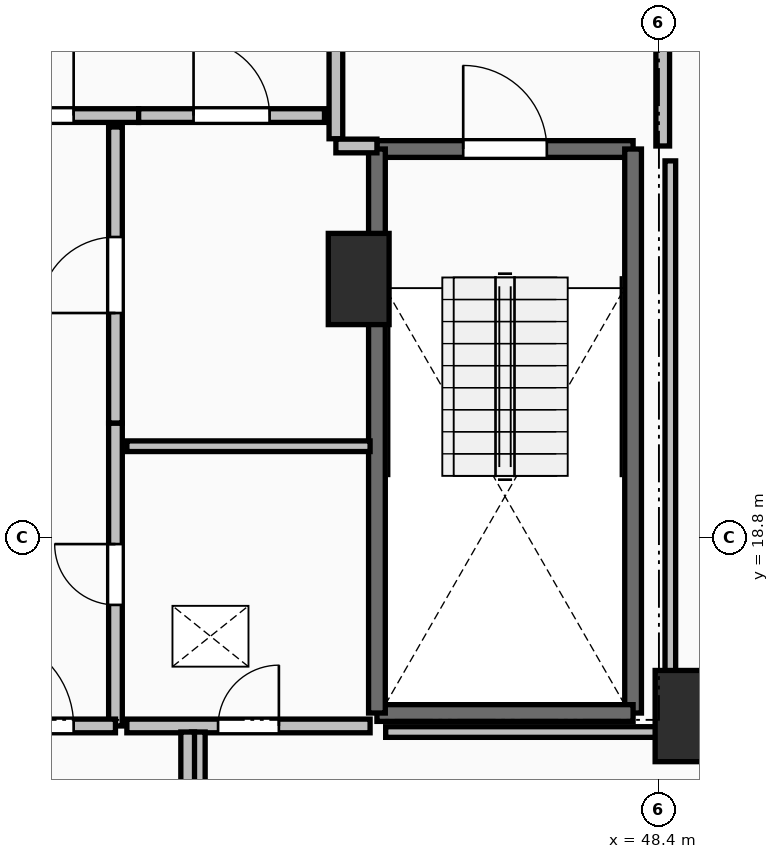
"""IFC4 building model, lengths in metres.
Left out: names, types, materials, properties, quantities, classifications, styles, units other than length and angle.
Written with IfcOpenShell. Run it as: python <this file> out.ifc"""

import sys

from ifc_helpers import new_model, si_unit, direction, frame, frame_2d, origin, origin_2d, place, context, subcontext, project, spatial, rectangle, extrude, element, fill, save


model = new_model("IFC4")
c1 = context("Model", 3, precision=1e-05, world=origin(), true_north=direction((0.0, 1.0)))
c2 = subcontext(c1, "Body", "Model", "MODEL_VIEW")
j1 = project(units=[si_unit("LENGTHUNIT", "METRE"), si_unit("PLANEANGLEUNIT", "RADIAN")], contexts=[c1])
p1 = place(None, origin())
s1 = spatial("IfcSite", under=j1, at=p1, CompositionType="ELEMENT")
p2 = place(p1, origin())
s2 = spatial("IfcBuilding", under=s1, at=p2, CompositionType="ELEMENT")
p3 = place(p2, frame((0.0, 0.0, 99.8)))
s3 = spatial("IfcBuildingStorey", under=s2, at=p3, CompositionType="ELEMENT", Elevation=99.8)
for number, where, z_axis, x_axis in (
    (1, (48.75, 16.45, 0.0), (0.0, 0.0, 1.0), (1.0, 0.0, 0.0)),
    (2, (44.45, 22.2, 0.0), (0.0, 0.0, 1.0), (1.0, 0.0, 0.0)),
):
    element("IfcColumn", number, at=place(p3, frame(where, z_axis=z_axis, x_axis=x_axis)), inside=s3, PredefinedType="PILASTER", context=c2, shape_type="SweptSolid", body=[
        extrude(rectangle(XDim=0.8, YDim=1.2, at=origin_2d()), origin(), (0.0, 0.0, 1.0), 3.5),
    ])
p4 = place(p3, frame((44.69, 23.91, 0.0), z_axis=(0.0, 0.0, 1.0), x_axis=(1.0, 0.0, 0.0)))
e3 = element("IfcWall", 3, at=p4, inside=s3, PredefinedType="SOLIDWALL", context=c2, shape_type="SweptSolid", body=[
    extrude(rectangle(XDim=3.37, YDim=0.22, at=frame_2d((1.685, 0.0))), origin(), (0.0, 0.0, 1.0), 3.24),
])
p5 = place(p4, frame((1.135, 0.0, 0.0)))
e4 = element("IfcOpeningElement", 4, at=p5, cuts=e3, PredefinedType="OPENING", context=c2, shape_type="SweptSolid", body=[
    extrude(rectangle(XDim=1.1, YDim=2.15, at=frame_2d((0.55, 1.075))), frame((0.0, 0.125, 0.0), z_axis=(0.0, -1.0, 0.0), x_axis=(1.0, 0.0, 0.0)), (0.0, 0.0, 1.0), 0.25),
])
p6 = place(p3, frame((48.06, 23.91, 0.0), z_axis=(0.0, 0.0, 1.0), x_axis=(0.0, -1.0, 0.0)))
e5 = element("IfcWall", 5, at=p6, inside=s3, PredefinedType="SOLIDWALL", context=c2, shape_type="SweptSolid", body=[
    extrude(rectangle(XDim=7.42, YDim=0.22, at=frame_2d((3.71, 0.0))), origin(), (0.0, 0.0, 1.0), 3.24),
])
p7 = place(p3, frame((48.06, 16.49, 0.0), z_axis=(0.0, 0.0, 1.0), x_axis=(-1.0, 0.0, 0.0)))
e6 = element("IfcWall", 6, at=p7, inside=s3, PredefinedType="SOLIDWALL", context=c2, shape_type="SweptSolid", body=[
    extrude(rectangle(XDim=3.37, YDim=0.22, at=frame_2d((1.685, 0.0))), origin(), (0.0, 0.0, 1.0), 3.24),
])
p8 = place(p3, frame((44.69, 16.49, 0.0), z_axis=(0.0, 0.0, 1.0), x_axis=(0.0, 1.0, 0.0)))
e7 = element("IfcWall", 7, at=p8, inside=s3, PredefinedType="SOLIDWALL", context=c2, shape_type="SweptSolid", body=[
    extrude(rectangle(XDim=7.42, YDim=0.22, at=frame_2d((3.71, 0.0))), origin(), (0.0, 0.0, 1.0), 3.24),
])
p9 = place(p3, frame((44.15, 27.955, 0.0), z_axis=(0.0, 0.0, 1.0), x_axis=(0.0, -1.0, 0.0)))
e8 = element("IfcWall", 8, at=p9, inside=s3, PredefinedType="PARTITIONING", context=c2, shape_type="SweptSolid", body=[
    extrude(rectangle(XDim=3.91, YDim=0.18, at=frame_2d((1.955, 0.0))), origin(), (0.0, 0.0, 1.0), 3.24),
])
p10 = place(p9, frame((1.355, 0.0, 0.0)))
e9 = element("IfcOpeningElement", 9, at=p10, cuts=e8, PredefinedType="OPENING", context=c2, shape_type="SweptSolid", body=[
    extrude(rectangle(XDim=1.2, YDim=2.15, at=frame_2d((0.6, 1.075))), frame((0.0, 0.105, 0.0), z_axis=(0.0, -1.0, 0.0), x_axis=(1.0, 0.0, 0.0)), (0.0, 0.0, 1.0), 0.21),
])
p11 = place(p3, frame((44.15, 23.95, 0.0), z_axis=(0.0, 0.0, 1.0), x_axis=(1.0, 0.0, 0.0)))
e10 = element("IfcWall", 10, at=p11, inside=s3, PredefinedType="PARTITIONING", context=c2, shape_type="SweptSolid", body=[
    extrude(rectangle(XDim=0.54, YDim=0.18, at=frame_2d((0.27, 0.0))), origin(), (0.0, 0.0, 1.0), 3.24),
])
p12 = place(p3, frame((48.45, 23.95, 0.0), z_axis=(0.0, 0.0, 1.0), x_axis=(0.0, 1.0, 0.0)))
e11 = element("IfcWall", 11, at=p12, inside=s3, PredefinedType="PARTITIONING", context=c2, shape_type="SweptSolid", body=[
    extrude(rectangle(XDim=4.05, YDim=0.18, at=frame_2d((2.025, 0.0))), origin(), (0.0, 0.0, 1.0), 3.24),
])
p13 = place(p12, frame((1.425, 0.0, 0.0)))
e12 = element("IfcOpeningElement", 12, at=p13, cuts=e11, PredefinedType="OPENING", context=c2, shape_type="SweptSolid", body=[
    extrude(rectangle(XDim=1.2, YDim=2.15, at=frame_2d((0.6, 1.075))), frame((0.0, 0.105, 0.0), z_axis=(0.0, -1.0, 0.0), x_axis=(1.0, 0.0, 0.0)), (0.0, 0.0, 1.0), 0.21),
])
p14 = place(p3, frame((38.645, 24.35, 0.0), z_axis=(0.0, 0.0, 1.0), x_axis=(1.0, 0.0, 0.0)))
e13 = element("IfcWall", 13, at=p14, inside=s3, PredefinedType="PARTITIONING", context=c2, shape_type="SweptSolid", body=[
    extrude(rectangle(XDim=2.91, YDim=0.18, at=frame_2d((1.455, 0.0))), origin(), (0.0, 0.0, 1.0), 3.24),
])
p15 = place(p14, frame((0.855, 0.0, 0.0)))
e14 = element("IfcOpeningElement", 14, at=p15, cuts=e13, PredefinedType="OPENING", context=c2, shape_type="SweptSolid", body=[
    extrude(rectangle(XDim=1.2, YDim=2.15, at=frame_2d((0.6, 1.075))), frame((0.0, 0.105, 0.0), z_axis=(0.0, -1.0, 0.0), x_axis=(1.0, 0.0, 0.0)), (0.0, 0.0, 1.0), 0.21),
])
p16 = place(p3, frame((41.555, 24.35, 0.0), z_axis=(0.0, 0.0, 1.0), x_axis=(1.0, 0.0, 0.0)))
e15 = element("IfcWall", 15, at=p16, inside=s3, PredefinedType="PARTITIONING", context=c2, shape_type="SweptSolid", body=[
    extrude(rectangle(XDim=2.445, YDim=0.18, at=frame_2d((1.223, 0.0))), origin(), (0.0, 0.0, 1.0), 3.24),
])
p17 = place(p16, frame((0.722, 0.0, 0.0)))
e16 = element("IfcOpeningElement", 16, at=p17, cuts=e15, PredefinedType="OPENING", context=c2, shape_type="SweptSolid", body=[
    extrude(rectangle(XDim=1.0, YDim=2.15, at=frame_2d((0.5, 1.075))), frame((0.0, 0.105, 0.0), z_axis=(0.0, -1.0, 0.0), x_axis=(1.0, 0.0, 0.0)), (0.0, 0.0, 1.0), 0.21),
])
p18 = place(p3, frame((41.25, 16.32, 0.0), z_axis=(0.0, 0.0, 1.0), x_axis=(0.0, 1.0, 0.0)))
e17 = element("IfcWall", 17, at=p18, inside=s3, PredefinedType="PARTITIONING", context=c2, shape_type="SweptSolid", body=[
    extrude(rectangle(XDim=3.985, YDim=0.18, at=frame_2d((1.992, 0.0))), origin(), (0.0, 0.0, 1.0), 3.24),
])
p19 = place(p18, frame((1.593, 0.0, 0.0)))
e18 = element("IfcOpeningElement", 18, at=p19, cuts=e17, PredefinedType="OPENING", context=c2, shape_type="SweptSolid", body=[
    extrude(rectangle(XDim=0.8, YDim=2.05, at=frame_2d((0.4, 1.025))), frame((0.0, 0.105, 0.0), z_axis=(0.0, -1.0, 0.0), x_axis=(1.0, 0.0, 0.0)), (0.0, 0.0, 1.0), 0.21),
])
p20 = place(p3, frame((41.25, 20.305, 0.0), z_axis=(0.0, 0.0, 1.0), x_axis=(0.0, 1.0, 0.0)))
e19 = element("IfcWall", 19, at=p20, inside=s3, PredefinedType="PARTITIONING", context=c2, shape_type="SweptSolid", body=[
    extrude(rectangle(XDim=3.895, YDim=0.18, at=frame_2d((1.948, 0.0))), origin(), (0.0, 0.0, 1.0), 3.24),
])
p21 = place(p20, frame((1.448, 0.0, 0.0)))
e20 = element("IfcOpeningElement", 20, at=p21, cuts=e19, PredefinedType="OPENING", context=c2, shape_type="SweptSolid", body=[
    extrude(rectangle(XDim=1.0, YDim=2.15, at=frame_2d((0.5, 1.075))), frame((0.0, 0.105, 0.0), z_axis=(0.0, -1.0, 0.0), x_axis=(1.0, 0.0, 0.0)), (0.0, 0.0, 1.0), 0.21),
])
p22 = place(p3, frame((38.95, 16.32, 0.0), z_axis=(0.0, 0.0, 1.0), x_axis=(1.0, 0.0, 0.0)))
e21 = element("IfcWall", 21, at=p22, inside=s3, PredefinedType="PARTITIONING", context=c2, shape_type="SweptSolid", body=[
    extrude(rectangle(XDim=2.3, YDim=0.18, at=frame_2d((1.15, 0.0))), origin(), (0.0, 0.0, 1.0), 3.24),
])
p23 = place(p22, frame((0.55, 0.0, 0.0)))
e22 = element("IfcOpeningElement", 22, at=p23, cuts=e21, PredefinedType="OPENING", context=c2, shape_type="SweptSolid", body=[
    extrude(rectangle(XDim=1.2, YDim=2.15, at=frame_2d((0.6, 1.075))), frame((0.0, 0.105, 0.0), z_axis=(0.0, -1.0, 0.0), x_axis=(1.0, 0.0, 0.0)), (0.0, 0.0, 1.0), 0.21),
])
p24 = place(p3, frame((44.6, 20.0, 0.0), z_axis=(0.0, 0.0, 1.0), x_axis=(-1.0, 0.0, 0.0)))
e23 = element("IfcWall", 23, at=p24, inside=s3, PredefinedType="PARTITIONING", context=c2, shape_type="SweptSolid", body=[
    extrude(rectangle(XDim=3.2, YDim=0.14, at=frame_2d((1.6, 0.0))), origin(), (0.0, 0.0, 1.0), 3.24),
])
p25 = place(p3, frame((41.4, 16.32, 0.0), z_axis=(0.0, 0.0, 1.0), x_axis=(1.0, 0.0, 0.0)))
e24 = element("IfcWall", 24, at=p25, inside=s3, PredefinedType="PARTITIONING", context=c2, shape_type="SweptSolid", body=[
    extrude(rectangle(XDim=3.2, YDim=0.18, at=frame_2d((1.6, 0.0))), origin(), (0.0, 0.0, 1.0), 3.24),
])
p26 = place(p25, frame((1.2, 0.0, 0.0)))
e25 = element("IfcOpeningElement", 25, at=p26, cuts=e24, PredefinedType="OPENING", context=c2, shape_type="SweptSolid", body=[
    extrude(rectangle(XDim=0.8, YDim=2.05, at=frame_2d((0.4, 1.025))), frame((0.0, 0.105, 0.0), z_axis=(0.0, -1.0, 0.0), x_axis=(1.0, 0.0, 0.0)), (0.0, 0.0, 1.0), 0.21),
])
for number, where, z_axis, x_axis in (
    (26, (42.34, 16.24, 0.0), (0.0, 0.0, 1.0), (0.0, -1.0, 0.0)),
    (27, (42.2, 14.1, 0.0), (0.0, 0.0, 1.0), (0.0, 1.0, 0.0)),
):
    element("IfcWall", number, at=place(p3, frame(where, z_axis=z_axis, x_axis=x_axis)), inside=s3, PredefinedType="PARTITIONING", context=c2, shape_type="SweptSolid", body=[
        extrude(rectangle(XDim=2.14, YDim=0.18, at=frame_2d((1.07, 0.0))), origin(), (0.0, 0.0, 1.0), 3.24),
    ])
p27 = place(p3, frame((48.55, 23.754, 0.0), z_axis=(0.0, 0.0, 1.0), x_axis=(0.0, -1.0, 0.0)))
e28 = element("IfcWall", 28, at=p27, inside=s3, PredefinedType="PARTITIONING", context=c2, shape_type="SweptSolid", body=[
    extrude(rectangle(XDim=7.514, YDim=0.14, at=frame_2d((3.757, 0.0))), origin(), (0.0, 0.0, 1.0), 2.432),
])
p28 = place(p3, frame((48.55, 16.24, 0.0), z_axis=(0.0, 0.0, 1.0), x_axis=(-1.0, 0.0, 0.0)))
e29 = element("IfcWall", 29, at=p28, inside=s3, PredefinedType="PARTITIONING", context=c2, shape_type="SweptSolid", body=[
    extrude(rectangle(XDim=3.745, YDim=0.14, at=frame_2d((1.873, 0.0))), origin(), (0.0, 0.0, 1.0), 2.432),
])
p29 = place(p5, origin())
e30 = element("IfcDoor", 30, at=p29, inside=s3, OperationType="SINGLE_SWING_LEFT", PredefinedType="DOOR", context=c2, shape_type="SweptSolid", body=[
    extrude(rectangle(XDim=1.1, YDim=2.15, at=frame_2d((0.55, 1.075))), frame((0.0, 0.025, 0.0), z_axis=(0.0, -1.0, 0.0), x_axis=(1.0, 0.0, 0.0)), (0.0, 0.0, 1.0), 0.05),
])
fill(e4, e30)
p30 = place(p15, origin())
e31 = element("IfcDoor", 31, at=p30, inside=s3, OperationType="SINGLE_SWING_RIGHT", PredefinedType="DOOR", context=c2, shape_type="SweptSolid", body=[
    extrude(rectangle(XDim=1.2, YDim=2.15, at=frame_2d((0.6, 1.075))), frame((0.0, 0.025, 0.0), z_axis=(0.0, -1.0, 0.0), x_axis=(1.0, 0.0, 0.0)), (0.0, 0.0, 1.0), 0.05),
])
fill(e14, e31)
p31 = place(p17, origin())
e32 = element("IfcDoor", 32, at=p31, inside=s3, OperationType="SINGLE_SWING_LEFT", PredefinedType="DOOR", context=c2, shape_type="SweptSolid", body=[
    extrude(rectangle(XDim=1.0, YDim=2.15, at=frame_2d((0.5, 1.075))), frame((0.0, 0.025, 0.0), z_axis=(0.0, -1.0, 0.0), x_axis=(1.0, 0.0, 0.0)), (0.0, 0.0, 1.0), 0.05),
])
fill(e16, e32)
p32 = place(p19, origin())
e33 = element("IfcDoor", 33, at=p32, inside=s3, OperationType="SINGLE_SWING_RIGHT", PredefinedType="DOOR", context=c2, shape_type="SweptSolid", body=[
    extrude(rectangle(XDim=0.8, YDim=2.05, at=frame_2d((0.4, 1.025))), frame((0.0, 0.025, 0.0), z_axis=(0.0, -1.0, 0.0), x_axis=(1.0, 0.0, 0.0)), (0.0, 0.0, 1.0), 0.05),
])
fill(e18, e33)
p33 = place(p21, origin())
e34 = element("IfcDoor", 34, at=p33, inside=s3, OperationType="SINGLE_SWING_LEFT", PredefinedType="DOOR", context=c2, shape_type="SweptSolid", body=[
    extrude(rectangle(XDim=1.0, YDim=2.15, at=frame_2d((0.5, 1.075))), frame((0.0, 0.025, 0.0), z_axis=(0.0, -1.0, 0.0), x_axis=(1.0, 0.0, 0.0)), (0.0, 0.0, 1.0), 0.05),
])
fill(e20, e34)
p34 = place(p23, origin())
e35 = element("IfcDoor", 35, at=p34, inside=s3, OperationType="SINGLE_SWING_LEFT", PredefinedType="DOOR", context=c2, shape_type="SweptSolid", body=[
    extrude(rectangle(XDim=1.2, YDim=2.15, at=frame_2d((0.6, 1.075))), frame((0.0, 0.025, 0.0), z_axis=(0.0, -1.0, 0.0), x_axis=(1.0, 0.0, 0.0)), (0.0, 0.0, 1.0), 0.05),
])
fill(e22, e35)
p35 = place(p26, origin())
e36 = element("IfcDoor", 36, at=p35, inside=s3, OperationType="SINGLE_SWING_RIGHT", PredefinedType="DOOR", context=c2, shape_type="SweptSolid", body=[
    extrude(rectangle(XDim=0.8, YDim=2.05, at=frame_2d((0.4, 1.025))), frame((0.0, 0.025, 0.0), z_axis=(0.0, -1.0, 0.0), x_axis=(1.0, 0.0, 0.0)), (0.0, 0.0, 1.0), 0.05),
])
fill(e25, e36)
save(model, sys.argv[1])
